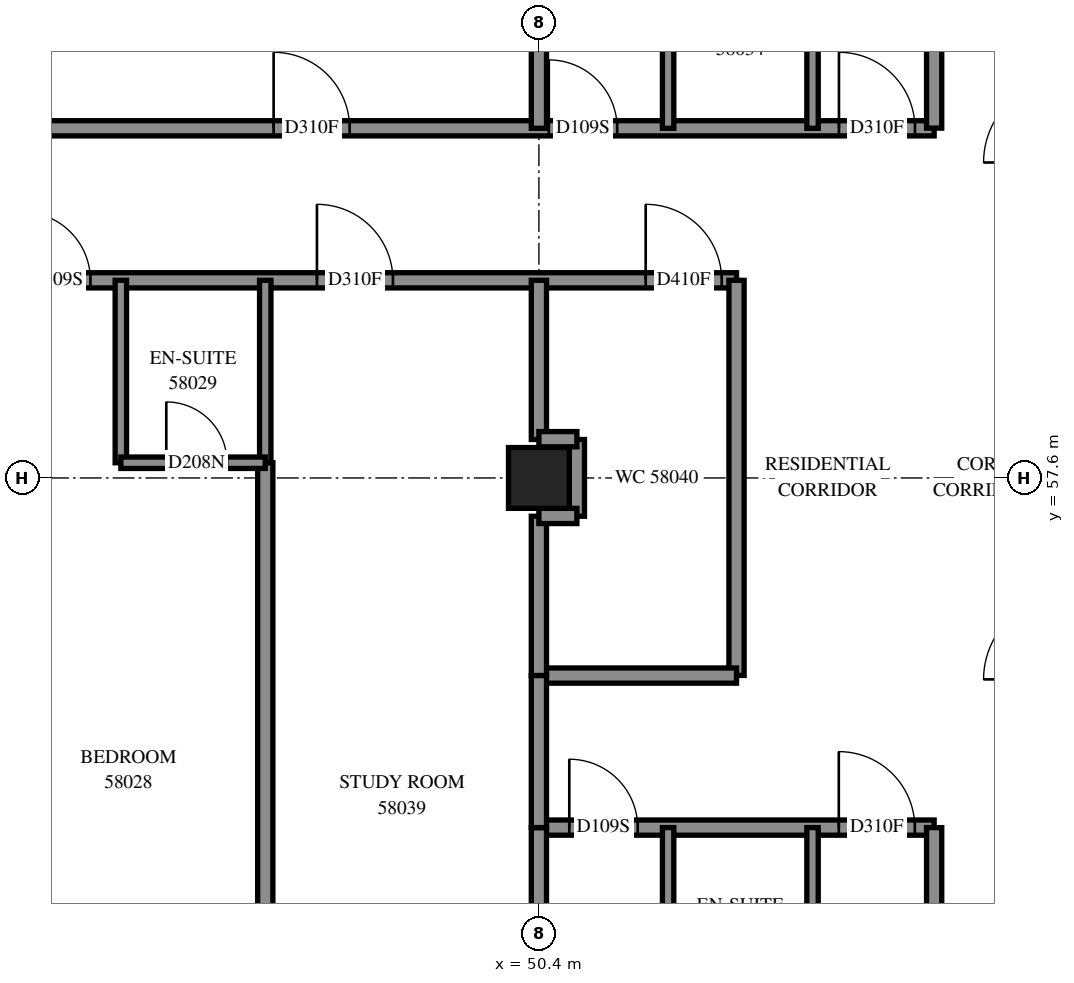
"""IFC4 building model, lengths in metres.
Left out: names, types, materials, properties, quantities, classifications, styles, units other than length and angle.
Written with IfcOpenShell. Run it as: python <this file> out.ifc"""

import sys

from ifc_helpers import new_model, si_unit, direction, frame, frame_2d, origin, origin_2d, place, context, subcontext, project, spatial, rectangle, extrude, element, fill, save


model = new_model("IFC4")
c1 = context("Model", 3, precision=1e-05, world=origin(), true_north=direction((0.0, 1.0)))
c2 = subcontext(c1, "Body", "Model", "MODEL_VIEW")
j1 = project(units=[si_unit("LENGTHUNIT", "METRE"), si_unit("PLANEANGLEUNIT", "RADIAN")], contexts=[c1])
p1 = place(None, origin())
s1 = spatial("IfcSite", under=j1, at=p1, CompositionType="ELEMENT")
p2 = place(p1, origin())
s2 = spatial("IfcBuilding", under=s1, at=p2, CompositionType="ELEMENT")
p3 = place(p2, frame((0.0, 0.0, 213.4)))
s3 = spatial("IfcBuildingStorey", under=s2, at=p3, CompositionType="ELEMENT", Elevation=213.4)
p4 = place(p3, frame((50.4, 57.6, 0.0), z_axis=(0.0, 0.0, 1.0), x_axis=(1.0, 0.0, 0.0)))
e1 = element("IfcColumn", 1, at=p4, inside=s3, PredefinedType="COLUMN", context=c2, shape_type="SweptSolid", body=[
    extrude(rectangle(XDim=0.8, YDim=0.8, at=origin_2d()), origin(), (0.0, 0.0, 1.0), 3.1),
])
p5 = place(p3, frame((36.0, 60.2, 0.0), z_axis=(0.0, 0.0, 1.0), x_axis=(1.0, 0.0, 0.0)))
e2 = element("IfcWall", 2, at=p5, inside=s3, PredefinedType="PARTITIONING", context=c2, shape_type="SweptSolid", body=[
    extrude(rectangle(XDim=17.0, YDim=0.2, at=frame_2d((8.5, 0.0))), origin(), (0.0, 0.0, 1.0), 3.1),
])
p6 = place(p5, frame((4.125, 0.0, 0.0)))
e3 = element("IfcOpeningElement", 3, at=p6, cuts=e2, PredefinedType="OPENING", context=c2, shape_type="SweptSolid", body=[
    extrude(rectangle(XDim=1.0, YDim=2.1, at=frame_2d((0.5, 1.05))), frame((0.0, 0.11, 0.0), z_axis=(0.0, -1.0, 0.0), x_axis=(1.0, 0.0, 0.0)), (0.0, 0.0, 1.0), 0.22),
])
p7 = place(p5, frame((7.6, 0.0, 0.0)))
e4 = element("IfcOpeningElement", 4, at=p7, cuts=e2, PredefinedType="OPENING", context=c2, shape_type="SweptSolid", body=[
    extrude(rectangle(XDim=0.9, YDim=2.1, at=frame_2d((0.45, 1.05))), frame((0.0, 0.11, 0.0), z_axis=(0.0, -1.0, 0.0), x_axis=(1.0, 0.0, 0.0)), (0.0, 0.0, 1.0), 0.22),
])
p8 = place(p5, frame((11.48, 0.0, 0.0)))
e5 = element("IfcOpeningElement", 5, at=p8, cuts=e2, PredefinedType="OPENING", context=c2, shape_type="SweptSolid", body=[
    extrude(rectangle(XDim=1.0, YDim=2.1, at=frame_2d((0.5, 1.05))), frame((0.0, 0.11, 0.0), z_axis=(0.0, -1.0, 0.0), x_axis=(1.0, 0.0, 0.0)), (0.0, 0.0, 1.0), 0.22),
])
p9 = place(p5, frame((15.805, 0.0, 0.0)))
e6 = element("IfcOpeningElement", 6, at=p9, cuts=e2, PredefinedType="OPENING", context=c2, shape_type="SweptSolid", body=[
    extrude(rectangle(XDim=1.0, YDim=2.1, at=frame_2d((0.5, 1.05))), frame((0.0, 0.11, 0.0), z_axis=(0.0, -1.0, 0.0), x_axis=(1.0, 0.0, 0.0)), (0.0, 0.0, 1.0), 0.22),
])
p10 = place(p3, frame((40.602, 62.2, 0.0), z_axis=(0.0, 0.0, 1.0), x_axis=(1.0, 0.0, 0.0)))
e7 = element("IfcWall", 7, at=p10, inside=s3, PredefinedType="PARTITIONING", context=c2, shape_type="SweptSolid", body=[
    extrude(rectangle(XDim=14.998, YDim=0.2, at=frame_2d((7.499, 0.0))), origin(), (0.0, 0.0, 1.0), 3.1),
])
p11 = place(p10, frame((6.308, 0.0, 0.0)))
e8 = element("IfcOpeningElement", 8, at=p11, cuts=e7, PredefinedType="OPENING", context=c2, shape_type="SweptSolid", body=[
    extrude(rectangle(XDim=1.0, YDim=2.1, at=frame_2d((0.5, 1.05))), frame((0.0, 0.11, 0.0), z_axis=(0.0, -1.0, 0.0), x_axis=(1.0, 0.0, 0.0)), (0.0, 0.0, 1.0), 0.22),
])
p12 = place(p10, frame((9.928, 0.0, 0.0)))
e9 = element("IfcOpeningElement", 9, at=p12, cuts=e7, PredefinedType="OPENING", context=c2, shape_type="SweptSolid", body=[
    extrude(rectangle(XDim=0.9, YDim=2.1, at=frame_2d((0.45, 1.05))), frame((0.0, 0.11, 0.0), z_axis=(0.0, -1.0, 0.0), x_axis=(1.0, 0.0, 0.0)), (0.0, 0.0, 1.0), 0.22),
])
p13 = place(p10, frame((13.746, 0.0, 0.0)))
e10 = element("IfcOpeningElement", 10, at=p13, cuts=e7, PredefinedType="OPENING", context=c2, shape_type="SweptSolid", body=[
    extrude(rectangle(XDim=1.0, YDim=2.1, at=frame_2d((0.5, 1.05))), frame((0.0, 0.11, 0.0), z_axis=(0.0, -1.0, 0.0), x_axis=(1.0, 0.0, 0.0)), (0.0, 0.0, 1.0), 0.22),
])
p14 = place(p3, frame((46.8, 49.7, 0.0), z_axis=(0.0, 0.0, 1.0), x_axis=(0.0, 1.0, 0.0)))
e11 = element("IfcWall", 11, at=p14, inside=s3, PredefinedType="PARTITIONING", context=c2, shape_type="SweptSolid", body=[
    extrude(rectangle(XDim=8.1, YDim=0.2, at=frame_2d((4.05, 0.0))), origin(), (0.0, 0.0, 1.0), 3.1),
])
p15 = place(p3, frame((50.4, 53.0, 0.0), z_axis=(0.0, 0.0, 1.0), x_axis=(1.0, 0.0, 0.0)))
e12 = element("IfcWall", 12, at=p15, inside=s3, PredefinedType="PARTITIONING", context=c2, shape_type="SweptSolid", body=[
    extrude(rectangle(XDim=5.2, YDim=0.2, at=frame_2d((2.6, 0.0))), origin(), (0.0, 0.0, 1.0), 3.1),
])
p16 = place(p15, frame((0.4, 0.0, 0.0)))
e13 = element("IfcOpeningElement", 13, at=p16, cuts=e12, PredefinedType="OPENING", context=c2, shape_type="SweptSolid", body=[
    extrude(rectangle(XDim=0.9, YDim=2.1, at=frame_2d((0.45, 1.05))), frame((0.0, 0.11, 0.0), z_axis=(0.0, -1.0, 0.0), x_axis=(1.0, 0.0, 0.0)), (0.0, 0.0, 1.0), 0.22),
])
p17 = place(p15, frame((3.946, 0.0, 0.0)))
e14 = element("IfcOpeningElement", 14, at=p17, cuts=e12, PredefinedType="OPENING", context=c2, shape_type="SweptSolid", body=[
    extrude(rectangle(XDim=1.0, YDim=2.1, at=frame_2d((0.5, 1.05))), frame((0.0, 0.11, 0.0), z_axis=(0.0, -1.0, 0.0), x_axis=(1.0, 0.0, 0.0)), (0.0, 0.0, 1.0), 0.22),
])
p18 = place(p3, frame((53.0, 55.002, 0.0), z_axis=(0.0, 0.0, 1.0), x_axis=(0.0, 1.0, 0.0)))
e15 = element("IfcWall", 15, at=p18, inside=s3, PredefinedType="PARTITIONING", context=c2, shape_type="SweptSolid", body=[
    extrude(rectangle(XDim=5.198, YDim=0.2, at=frame_2d((2.599, 0.0))), origin(), (0.0, 0.0, 1.0), 3.1),
])
p19 = place(p3, frame((55.6, 48.4, 0.0), z_axis=(0.0, 0.0, 1.0), x_axis=(0.0, 1.0, 0.0)))
e16 = element("IfcWall", 16, at=p19, inside=s3, PredefinedType="PARTITIONING", context=c2, shape_type="SweptSolid", body=[
    extrude(rectangle(XDim=4.6, YDim=0.2, at=frame_2d((2.3, 0.0))), origin(), (0.0, 0.0, 1.0), 3.1),
])
p20 = place(p3, frame((55.6, 62.202, 0.0), z_axis=(0.0, 0.0, 1.0), x_axis=(0.0, 1.0, 0.0)))
e17 = element("IfcWall", 17, at=p20, inside=s3, PredefinedType="PARTITIONING", context=c2, shape_type="SweptSolid", body=[
    extrude(rectangle(XDim=4.598, YDim=0.2, at=frame_2d((2.299, 0.0))), origin(), (0.0, 0.0, 1.0), 3.1),
])
p21 = place(p3, frame((50.4, 55.0, 0.0), z_axis=(0.0, 0.0, 1.0), x_axis=(1.0, 0.0, 0.0)))
e18 = element("IfcWall", 18, at=p21, inside=s3, PredefinedType="PARTITIONING", context=c2, shape_type="SweptSolid", body=[
    extrude(rectangle(XDim=2.6, YDim=0.2, at=frame_2d((1.3, 0.0))), origin(), (0.0, 0.0, 1.0), 3.1),
])
for number, where, z_axis, x_axis in (
    (19, (44.9, 57.8, 0.0), (0.0, 0.0, 1.0), (0.0, 1.0, 0.0)),
    (20, (46.8, 57.8, 0.0), (0.0, 0.0, 1.0), (0.0, 1.0, 0.0)),
    (21, (52.1, 50.6, 0.0), (0.0, 0.0, 1.0), (0.0, 1.0, 0.0)),
    (22, (54.0, 50.6, 0.0), (0.0, 0.0, 1.0), (0.0, 1.0, 0.0)),
    (23, (52.1, 62.2, 0.0), (0.0, 0.0, 1.0), (0.0, 1.0, 0.0)),
    (24, (54.0, 62.2, 0.0), (0.0, 0.0, 1.0), (0.0, 1.0, 0.0)),
):
    element("IfcWall", number, at=place(p3, frame(where, z_axis=z_axis, x_axis=x_axis)), inside=s3, PredefinedType="PARTITIONING", context=c2, shape_type="SweptSolid", body=[
        extrude(rectangle(XDim=2.4, YDim=0.15, at=frame_2d((1.2, 0.0))), origin(), (0.0, 0.0, 1.0), 3.1),
    ])
p22 = place(p3, frame((50.4, 50.8, 0.0), z_axis=(0.0, 0.0, 1.0), x_axis=(0.0, 1.0, 0.0)))
e25 = element("IfcWall", 25, at=p22, inside=s3, PredefinedType="PARTITIONING", context=c2, shape_type="SweptSolid", body=[
    extrude(rectangle(XDim=2.2, YDim=0.2, at=frame_2d((1.1, 0.0))), origin(), (0.0, 0.0, 1.0), 3.1),
])
for number, where, z_axis, x_axis in (
    (26, (50.4, 62.2, 0.0), (0.0, 0.0, 1.0), (0.0, 1.0, 0.0)),
    (27, (50.4, 55.0, 0.0), (0.0, 0.0, 1.0), (0.0, 1.0, 0.0)),
):
    element("IfcWall", number, at=place(p3, frame(where, z_axis=z_axis, x_axis=x_axis)), inside=s3, PredefinedType="PARTITIONING", context=c2, shape_type="SweptSolid", body=[
        extrude(rectangle(XDim=2.096, YDim=0.2, at=frame_2d((1.048, 0.0))), origin(), (0.0, 0.0, 1.0), 3.1),
    ])
p23 = place(p3, frame((50.4, 58.106, 0.0), z_axis=(0.0, 0.0, 1.0), x_axis=(0.0, 1.0, 0.0)))
e28 = element("IfcWall", 28, at=p23, inside=s3, PredefinedType="PARTITIONING", context=c2, shape_type="SweptSolid", body=[
    extrude(rectangle(XDim=2.094, YDim=0.2, at=frame_2d((1.047, 0.0))), origin(), (0.0, 0.0, 1.0), 3.1),
])
p24 = place(p3, frame((50.4, 53.0, 0.0), z_axis=(0.0, 0.0, 1.0), x_axis=(0.0, 1.0, 0.0)))
e29 = element("IfcWall", 29, at=p24, inside=s3, PredefinedType="PARTITIONING", context=c2, shape_type="SweptSolid", body=[
    extrude(rectangle(XDim=2.0, YDim=0.2, at=frame_2d((1.0, 0.0))), origin(), (0.0, 0.0, 1.0), 3.1),
])
p25 = place(p3, frame((44.9, 57.8, 0.0), z_axis=(0.0, 0.0, 1.0), x_axis=(1.0, 0.0, 0.0)))
e30 = element("IfcWall", 30, at=p25, inside=s3, PredefinedType="PARTITIONING", context=c2, shape_type="SweptSolid", body=[
    extrude(rectangle(XDim=1.9, YDim=0.15, at=frame_2d((0.95, 0.0))), origin(), (0.0, 0.0, 1.0), 3.1),
])
p26 = place(p25, frame((0.598, 0.0, 0.0)))
e31 = element("IfcOpeningElement", 31, at=p26, cuts=e30, PredefinedType="OPENING", context=c2, shape_type="SweptSolid", body=[
    extrude(rectangle(XDim=0.8, YDim=2.1, at=frame_2d((0.4, 1.05))), frame((0.0, 0.085, 0.0), z_axis=(0.0, -1.0, 0.0), x_axis=(1.0, 0.0, 0.0)), (0.0, 0.0, 1.0), 0.17),
])
p27 = place(p3, frame((50.9, 57.096, 0.0), z_axis=(0.0, 0.0, 1.0), x_axis=(0.0, 1.0, 0.0)))
e32 = element("IfcWall", 32, at=p27, inside=s3, PredefinedType="PARTITIONING", context=c2, shape_type="SweptSolid", body=[
    extrude(rectangle(XDim=1.01, YDim=0.2, at=frame_2d((0.505, 0.0))), origin(), (0.0, 0.0, 1.0), 3.1),
])
for number, where, z_axis, x_axis in (
    (33, (50.4, 58.11, 0.0), (0.0, 0.0, 1.0), (1.0, 0.0, 0.0)),
    (34, (50.4, 57.1, 0.0), (0.0, 0.0, 1.0), (1.0, 0.0, 0.0)),
):
    element("IfcWall", number, at=place(p3, frame(where, z_axis=z_axis, x_axis=x_axis)), inside=s3, PredefinedType="PARTITIONING", context=c2, shape_type="SweptSolid", body=[
        extrude(rectangle(XDim=0.5, YDim=0.2, at=frame_2d((0.25, 0.0))), origin(), (0.0, 0.0, 1.0), 3.1),
    ])
p28 = place(p7, origin())
e35 = element("IfcDoor", 35, at=p28, inside=s3, OperationType="SINGLE_SWING_LEFT", PredefinedType="DOOR", context=c2, shape_type="SweptSolid", body=[
    extrude(rectangle(XDim=0.9, YDim=2.1, at=frame_2d((0.45, 1.05))), frame((0.0, 0.025, 0.0), z_axis=(0.0, -1.0, 0.0), x_axis=(1.0, 0.0, 0.0)), (0.0, 0.0, 1.0), 0.05),
])
fill(e4, e35)
p29 = place(p26, origin())
e36 = element("IfcDoor", 36, at=p29, inside=s3, OperationType="SINGLE_SWING_RIGHT", PredefinedType="DOOR", context=c2, shape_type="SweptSolid", body=[
    extrude(rectangle(XDim=0.8, YDim=2.1, at=frame_2d((0.4, 1.05))), frame((0.0, 0.025, 0.0), z_axis=(0.0, -1.0, 0.0), x_axis=(1.0, 0.0, 0.0)), (0.0, 0.0, 1.0), 0.05),
])
fill(e31, e36)
p30 = place(p11, origin())
e37 = element("IfcDoor", 37, at=p30, inside=s3, OperationType="SINGLE_SWING_RIGHT", PredefinedType="DOOR", context=c2, shape_type="SweptSolid", body=[
    extrude(rectangle(XDim=1.0, YDim=2.1, at=frame_2d((0.5, 1.05))), frame((0.0, 0.025, 0.0), z_axis=(0.0, -1.0, 0.0), x_axis=(1.0, 0.0, 0.0)), (0.0, 0.0, 1.0), 0.05),
])
fill(e8, e37)
p31 = place(p12, origin())
e38 = element("IfcDoor", 38, at=p31, inside=s3, OperationType="SINGLE_SWING_RIGHT", PredefinedType="DOOR", context=c2, shape_type="SweptSolid", body=[
    extrude(rectangle(XDim=0.9, YDim=2.1, at=frame_2d((0.45, 1.05))), frame((0.0, 0.025, 0.0), z_axis=(0.0, -1.0, 0.0), x_axis=(1.0, 0.0, 0.0)), (0.0, 0.0, 1.0), 0.05),
])
fill(e9, e38)
p32 = place(p13, origin())
e39 = element("IfcDoor", 39, at=p32, inside=s3, OperationType="SINGLE_SWING_LEFT", PredefinedType="DOOR", context=c2, shape_type="SweptSolid", body=[
    extrude(rectangle(XDim=1.0, YDim=2.1, at=frame_2d((0.5, 1.05))), frame((0.0, 0.025, 0.0), z_axis=(0.0, -1.0, 0.0), x_axis=(1.0, 0.0, 0.0)), (0.0, 0.0, 1.0), 0.05),
])
fill(e10, e39)
p33 = place(p8, origin())
e40 = element("IfcDoor", 40, at=p33, inside=s3, OperationType="SINGLE_SWING_RIGHT", PredefinedType="DOOR", context=c2, shape_type="SweptSolid", body=[
    extrude(rectangle(XDim=1.0, YDim=2.1, at=frame_2d((0.5, 1.05))), frame((0.0, 0.025, 0.0), z_axis=(0.0, -1.0, 0.0), x_axis=(1.0, 0.0, 0.0)), (0.0, 0.0, 1.0), 0.05),
])
fill(e5, e40)
p34 = place(p9, origin())
e41 = element("IfcDoor", 41, at=p34, inside=s3, OperationType="SINGLE_SWING_LEFT", PredefinedType="DOOR", context=c2, shape_type="SweptSolid", body=[
    extrude(rectangle(XDim=1.0, YDim=2.1, at=frame_2d((0.5, 1.05))), frame((0.0, 0.025, 0.0), z_axis=(0.0, -1.0, 0.0), x_axis=(1.0, 0.0, 0.0)), (0.0, 0.0, 1.0), 0.05),
])
fill(e6, e41)
p35 = place(p16, origin())
e42 = element("IfcDoor", 42, at=p35, inside=s3, OperationType="SINGLE_SWING_LEFT", PredefinedType="DOOR", context=c2, shape_type="SweptSolid", body=[
    extrude(rectangle(XDim=0.9, YDim=2.1, at=frame_2d((0.45, 1.05))), frame((0.0, 0.025, 0.0), z_axis=(0.0, -1.0, 0.0), x_axis=(1.0, 0.0, 0.0)), (0.0, 0.0, 1.0), 0.05),
])
fill(e13, e42)
p36 = place(p17, origin())
e43 = element("IfcDoor", 43, at=p36, inside=s3, OperationType="SINGLE_SWING_RIGHT", PredefinedType="DOOR", context=c2, shape_type="SweptSolid", body=[
    extrude(rectangle(XDim=1.0, YDim=2.1, at=frame_2d((0.5, 1.05))), frame((0.0, 0.025, 0.0), z_axis=(0.0, -1.0, 0.0), x_axis=(1.0, 0.0, 0.0)), (0.0, 0.0, 1.0), 0.05),
])
fill(e14, e43)
save(model, sys.argv[1])
